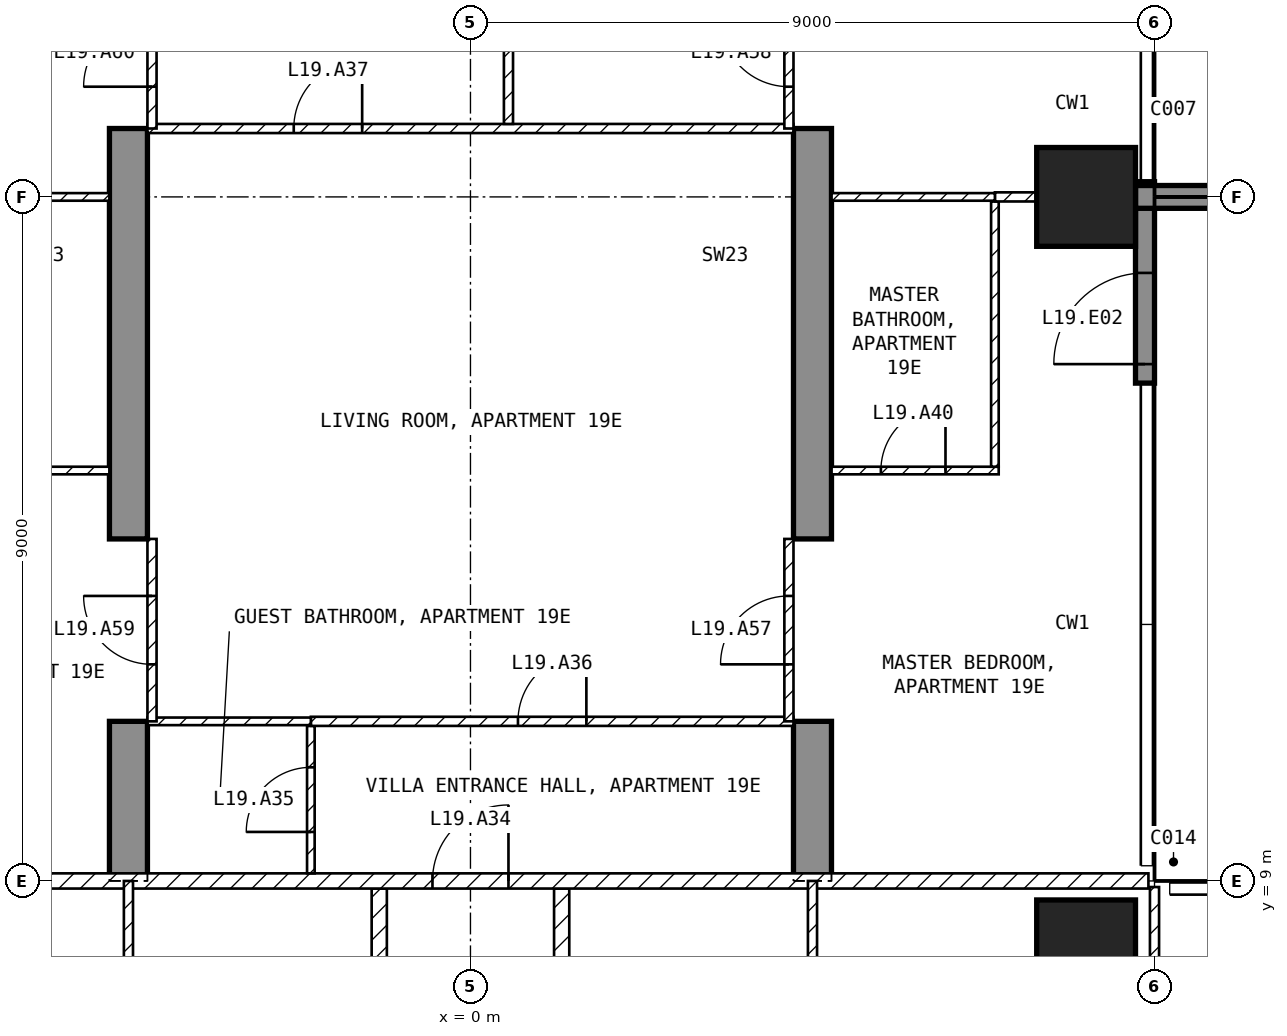
"""IFC4 building model, lengths in metres.
Left out: names, types, materials, properties, quantities, classifications, styles, units other than length and angle.
Written with IfcOpenShell. Run it as: python <this file> out.ifc"""

import sys

from ifc_helpers import new_model, si_unit, direction, frame, frame_2d, origin, origin_2d, place, context, subcontext, project, spatial, polyline, rectangle, outline, extrude, element, fill, save


model = new_model("IFC4")
c1 = context("Model", 3, precision=1e-05, world=origin(), true_north=direction((0.0, 1.0)))
c2 = subcontext(c1, "Body", "Model", "MODEL_VIEW")
j1 = project(units=[si_unit("LENGTHUNIT", "METRE"), si_unit("PLANEANGLEUNIT", "RADIAN")], contexts=[c1])
p1 = place(None, origin())
s1 = spatial("IfcSite", under=j1, at=p1, CompositionType="ELEMENT")
p2 = place(p1, origin())
s2 = spatial("IfcBuilding", under=s1, at=p2, CompositionType="ELEMENT")
p3 = place(p2, frame((0.0, 0.0, 85.5)))
s3 = spatial("IfcBuildingStorey", under=s2, at=p3, CompositionType="ELEMENT", Elevation=85.5)
for number, where, z_axis, x_axis in (
    (1, (8.1, 8.1, -0.25), (0.0, 0.0, 1.0), (1.0, 0.0, 0.0)),
    (2, (8.1, 18.0, -0.25), (0.0, 0.0, 1.0), (1.0, 0.0, 0.0)),
):
    element("IfcColumn", number, at=place(p3, frame(where, z_axis=z_axis, x_axis=x_axis)), inside=s3, PredefinedType="COLUMN", context=c2, shape_type="SweptSolid", body=[
        extrude(rectangle(XDim=1.3, YDim=1.3, at=origin_2d()), origin(), (0.0, 0.0, 1.0), 3.5),
    ])
for number, where, z_axis, x_axis in (
    (3, (-4.75, 9.0, -0.25), (1.0, 0.0, 0.0), (0.0, 1.0, 0.0)),
    (4, (4.25, 9.0, -0.25), (1.0, 0.0, 0.0), (0.0, 1.0, 0.0)),
):
    element("IfcWall", number, at=place(p3, frame(where, z_axis=z_axis, x_axis=x_axis)), inside=s3, PredefinedType="SHEAR", context=c2, shape_type="SweptSolid", body=[
        extrude(outline(polyline([(0.0, 0.0), (2.1, 0.0), (2.1, 2.65), (4.5, 2.65), (4.5, 0.0), (9.9, 0.0), (9.9, 2.65), (12.3, 2.65), (12.3, 0.0), (16.45, 0.0), (16.45, 3.5), (0.0, 3.5), (0.0, 0.0)])), origin(), (0.0, 0.0, 1.0), 0.5),
    ])
p4 = place(p3, frame((8.875, 15.55, 0.0), z_axis=(0.0, 0.0, 1.0), x_axis=(0.0, 1.0, 0.0)))
e5 = element("IfcWall", 5, at=p4, inside=s3, PredefinedType="SOLIDWALL", context=c2, shape_type="SweptSolid", body=[
    extrude(rectangle(XDim=2.65, YDim=0.25, at=frame_2d((1.325, 0.0))), origin(), (0.0, 0.0, 1.0), 3.25),
])
p5 = place(p4, frame((0.25, 0.0, 0.0)))
e6 = element("IfcOpeningElement", 6, at=p5, cuts=e5, PredefinedType="OPENING", context=c2, shape_type="SweptSolid", body=[
    extrude(rectangle(XDim=1.2, YDim=2.4, at=frame_2d((0.6, 1.2))), frame((0.0, 0.135, 0.0), z_axis=(0.0, -1.0, 0.0), x_axis=(1.0, 0.0, 0.0)), (0.0, 0.0, 1.0), 0.27),
])
p6 = place(p3, frame((8.75, 18.0, 0.0), z_axis=(0.0, 0.0, 1.0), x_axis=(1.0, 0.0, 0.0)))
e7 = element("IfcWall", 7, at=p6, inside=s3, PredefinedType="SOLIDWALL", context=c2, shape_type="SweptSolid", body=[
    extrude(rectangle(XDim=2.95, YDim=0.3, at=frame_2d((1.475, 0.0))), origin(), (0.0, 0.0, 1.0), 3.25),
])
for number, where, z_axis, x_axis in (
    (8, (1.2, 8.9, 0.0), (0.0, 0.0, 1.0), (0.0, -1.0, 0.0)),
    (9, (-1.2, 1.3, 0.0), (0.0, 0.0, 1.0), (0.0, 1.0, 0.0)),
):
    element("IfcWall", number, at=place(p3, frame(where, z_axis=z_axis, x_axis=x_axis)), inside=s3, PredefinedType="PARTITIONING", context=c2, shape_type="SweptSolid", body=[
        extrude(rectangle(XDim=7.6, YDim=0.2, at=frame_2d((3.8, 0.0))), origin(), (0.0, 0.0, 1.0), 3.25),
    ])
p7 = place(p3, frame((-8.92, 9.0, 0.0), z_axis=(0.0, 0.0, 1.0), x_axis=(1.0, 0.0, 0.0)))
e10 = element("IfcWall", 10, at=p7, inside=s3, PredefinedType="PARTITIONING", context=c2, shape_type="SweptSolid", body=[
    extrude(rectangle(XDim=17.84, YDim=0.2, at=frame_2d((8.92, 0.0))), origin(), (0.0, 0.0, 1.0), 3.25),
])
p8 = place(p7, frame((8.42, 0.0, 0.0)))
e11 = element("IfcOpeningElement", 11, at=p8, cuts=e10, PredefinedType="OPENING", context=c2, shape_type="SweptSolid", body=[
    extrude(rectangle(XDim=1.0, YDim=2.1, at=frame_2d((0.5, 1.05))), frame((0.0, 0.11, 0.0), z_axis=(0.0, -1.0, 0.0), x_axis=(1.0, 0.0, 0.0)), (0.0, 0.0, 1.0), 0.22),
])
p9 = place(p3, frame((9.0, 5.1, 0.0), z_axis=(0.0, 0.0, 1.0), x_axis=(0.0, 1.0, 0.0)))
e12 = element("IfcWall", 12, at=p9, inside=s3, PredefinedType="PARTITIONING", context=c2, shape_type="SweptSolid", body=[
    extrude(rectangle(XDim=3.82, YDim=0.12, at=frame_2d((1.91, 0.0))), origin(), (0.0, 0.0, 1.0), 3.25),
])
p10 = place(p9, frame((0.25, 0.0, 0.0)))
e13 = element("IfcOpeningElement", 13, at=p10, cuts=e12, PredefinedType="OPENING", context=c2, shape_type="SweptSolid", body=[
    extrude(rectangle(XDim=0.9, YDim=2.1, at=frame_2d((0.45, 1.05))), frame((0.0, 0.07, 0.0), z_axis=(0.0, -1.0, 0.0), x_axis=(1.0, 0.0, 0.0)), (0.0, 0.0, 1.0), 0.14),
])
p11 = place(p3, frame((4.5, 1.3, 0.0), z_axis=(0.0, 0.0, 1.0), x_axis=(0.0, 1.0, 0.0)))
e14 = element("IfcWall", 14, at=p11, inside=s3, PredefinedType="PARTITIONING", context=c2, shape_type="SweptSolid", body=[
    extrude(rectangle(XDim=7.7, YDim=0.12, at=frame_2d((3.85, 0.0))), origin(), (0.0, 0.0, 1.0), 3.25),
])
p12 = place(p11, frame((4.988, 0.0, 0.0)))
e15 = element("IfcOpeningElement", 15, at=p12, cuts=e14, PredefinedType="OPENING", context=c2, shape_type="SweptSolid", body=[
    extrude(rectangle(XDim=0.9, YDim=2.1, at=frame_2d((0.45, 1.05))), frame((0.0, 0.07, 0.0), z_axis=(0.0, -1.0, 0.0), x_axis=(1.0, 0.0, 0.0)), (0.0, 0.0, 1.0), 0.14),
])
p13 = place(p3, frame((-4.5, 9.0, 0.0), z_axis=(0.0, 0.0, 1.0), x_axis=(0.0, -1.0, 0.0)))
e16 = element("IfcWall", 16, at=p13, inside=s3, PredefinedType="PARTITIONING", context=c2, shape_type="SweptSolid", body=[
    extrude(rectangle(XDim=7.7, YDim=0.12, at=frame_2d((3.85, 0.0))), origin(), (0.0, 0.0, 1.0), 3.25),
])
p14 = place(p13, frame((4.96, 0.0, 0.0)))
e17 = element("IfcOpeningElement", 17, at=p14, cuts=e16, PredefinedType="OPENING", context=c2, shape_type="SweptSolid", body=[
    extrude(rectangle(XDim=0.9, YDim=2.1, at=frame_2d((0.45, 1.05))), frame((0.0, 0.07, 0.0), z_axis=(0.0, -1.0, 0.0), x_axis=(1.0, 0.0, 0.0)), (0.0, 0.0, 1.0), 0.14),
])
p15 = place(p3, frame((-2.1, 9.1, 0.0), z_axis=(0.0, 0.0, 1.0), x_axis=(0.0, 1.0, 0.0)))
e18 = element("IfcWall", 18, at=p15, inside=s3, PredefinedType="PARTITIONING", context=c2, shape_type="SweptSolid", body=[
    extrude(rectangle(XDim=1.94, YDim=0.1, at=frame_2d((0.97, 0.0))), origin(), (0.0, 0.0, 1.0), 3.25),
])
p16 = place(p15, frame((0.545, 0.0, 0.0)))
e19 = element("IfcOpeningElement", 19, at=p16, cuts=e18, PredefinedType="OPENING", context=c2, shape_type="SweptSolid", body=[
    extrude(rectangle(XDim=0.85, YDim=2.1, at=frame_2d((0.425, 1.05))), frame((0.0, 0.06, 0.0), z_axis=(0.0, -1.0, 0.0), x_axis=(1.0, 0.0, 0.0)), (0.0, 0.0, 1.0), 0.12),
])
p17 = place(p3, frame((-2.1, 11.1, 0.0), z_axis=(0.0, 0.0, 1.0), x_axis=(1.0, 0.0, 0.0)))
e20 = element("IfcWall", 20, at=p17, inside=s3, PredefinedType="PARTITIONING", context=c2, shape_type="SweptSolid", body=[
    extrude(rectangle(XDim=6.35, YDim=0.12, at=frame_2d((3.175, 0.0))), origin(), (0.0, 0.0, 1.0), 3.25),
])
p18 = place(p17, frame((2.725, 0.0, 0.0)))
e21 = element("IfcOpeningElement", 21, at=p18, cuts=e20, PredefinedType="OPENING", context=c2, shape_type="SweptSolid", body=[
    extrude(rectangle(XDim=0.9, YDim=2.1, at=frame_2d((0.45, 1.05))), frame((0.0, 0.07, 0.0), z_axis=(0.0, -1.0, 0.0), x_axis=(1.0, 0.0, 0.0)), (0.0, 0.0, 1.0), 0.14),
])
p19 = place(p3, frame((-4.25, 11.1, 0.0), z_axis=(0.0, 0.0, 1.0), x_axis=(1.0, 0.0, 0.0)))
e22 = element("IfcWall", 22, at=p19, inside=s3, PredefinedType="PARTITIONING", context=c2, shape_type="SweptSolid", body=[
    extrude(rectangle(XDim=2.15, YDim=0.1, at=frame_2d((1.075, 0.0))), origin(), (0.0, 0.0, 1.0), 3.25),
])
p20 = place(p3, frame((-4.25, 18.9, 0.0), z_axis=(0.0, 0.0, 1.0), x_axis=(1.0, 0.0, 0.0)))
e23 = element("IfcWall", 23, at=p20, inside=s3, PredefinedType="PARTITIONING", context=c2, shape_type="SweptSolid", body=[
    extrude(rectangle(XDim=8.5, YDim=0.12, at=frame_2d((4.25, 0.0))), origin(), (0.0, 0.0, 1.0), 3.25),
])
p21 = place(p20, frame((1.925, 0.0, 0.0)))
e24 = element("IfcOpeningElement", 24, at=p21, cuts=e23, PredefinedType="OPENING", context=c2, shape_type="SweptSolid", body=[
    extrude(rectangle(XDim=0.9, YDim=2.1, at=frame_2d((0.45, 1.05))), frame((0.0, 0.07, 0.0), z_axis=(0.0, -1.0, 0.0), x_axis=(1.0, 0.0, 0.0)), (0.0, 0.0, 1.0), 0.14),
])
p22 = place(p3, frame((0.5, 23.34, 0.0), z_axis=(0.0, 0.0, 1.0), x_axis=(0.0, -1.0, 0.0)))
e25 = element("IfcWall", 25, at=p22, inside=s3, PredefinedType="PARTITIONING", context=c2, shape_type="SweptSolid", body=[
    extrude(rectangle(XDim=4.38, YDim=0.12, at=frame_2d((2.19, 0.0))), origin(), (0.0, 0.0, 1.0), 3.25),
])
p23 = place(p22, frame((1.74, 0.0, 0.0)))
e26 = element("IfcOpeningElement", 26, at=p23, cuts=e25, PredefinedType="OPENING", context=c2, shape_type="SweptSolid", body=[
    extrude(rectangle(XDim=0.9, YDim=2.1, at=frame_2d((0.45, 1.05))), frame((0.0, 0.07, 0.0), z_axis=(0.0, -1.0, 0.0), x_axis=(1.0, 0.0, 0.0)), (0.0, 0.0, 1.0), 0.14),
])
p24 = place(p3, frame((4.75, 14.4, 0.0), z_axis=(0.0, 0.0, 1.0), x_axis=(1.0, 0.0, 0.0)))
e27 = element("IfcWall", 27, at=p24, inside=s3, PredefinedType="PARTITIONING", context=c2, shape_type="SweptSolid", body=[
    extrude(rectangle(XDim=2.2, YDim=0.1, at=frame_2d((1.1, 0.0))), origin(), (0.0, 0.0, 1.0), 3.25),
])
p25 = place(p24, frame((0.65, 0.0, 0.0)))
e28 = element("IfcOpeningElement", 28, at=p25, cuts=e27, PredefinedType="OPENING", context=c2, shape_type="SweptSolid", body=[
    extrude(rectangle(XDim=0.85, YDim=2.1, at=frame_2d((0.425, 1.05))), frame((0.0, 0.06, 0.0), z_axis=(0.0, -1.0, 0.0), x_axis=(1.0, 0.0, 0.0)), (0.0, 0.0, 1.0), 0.12),
])
p26 = place(p3, frame((6.9, 14.45, 0.0), z_axis=(0.0, 0.0, 1.0), x_axis=(0.0, 1.0, 0.0)))
e29 = element("IfcWall", 29, at=p26, inside=s3, PredefinedType="PARTITIONING", context=c2, shape_type="SweptSolid", body=[
    extrude(rectangle(XDim=3.49, YDim=0.1, at=frame_2d((1.745, 0.0))), origin(), (0.0, 0.0, 1.0), 3.25),
])
p27 = place(p3, frame((6.9, 18.0, 0.0), z_axis=(0.0, 0.0, 1.0), x_axis=(1.0, 0.0, 0.0)))
e30 = element("IfcWall", 30, at=p27, inside=s3, PredefinedType="PARTITIONING", context=c2, shape_type="SweptSolid", body=[
    extrude(rectangle(XDim=0.55, YDim=0.12, at=frame_2d((0.275, 0.0))), origin(), (0.0, 0.0, 1.0), 2.346),
])
p28 = place(p3, frame((4.75, 18.0, 0.0), z_axis=(0.0, 0.0, 1.0), x_axis=(1.0, 0.0, 0.0)))
e31 = element("IfcWall", 31, at=p28, inside=s3, PredefinedType="PARTITIONING", context=c2, shape_type="SweptSolid", body=[
    extrude(rectangle(XDim=2.15, YDim=0.1, at=frame_2d((1.075, 0.0))), origin(), (0.0, 0.0, 1.0), 2.346),
])
p29 = place(p3, frame((-6.95, 14.4, 0.0), z_axis=(0.0, 0.0, 1.0), x_axis=(1.0, 0.0, 0.0)))
e32 = element("IfcWall", 32, at=p29, inside=s3, PredefinedType="PARTITIONING", context=c2, shape_type="SweptSolid", body=[
    extrude(rectangle(XDim=2.2, YDim=0.1, at=frame_2d((1.1, 0.0))), origin(), (0.0, 0.0, 1.0), 3.25),
])
p30 = place(p3, frame((-6.9, 18.0, 0.0), z_axis=(0.0, 0.0, 1.0), x_axis=(1.0, 0.0, 0.0)))
e33 = element("IfcWall", 33, at=p30, inside=s3, PredefinedType="PARTITIONING", context=c2, shape_type="SweptSolid", body=[
    extrude(rectangle(XDim=2.15, YDim=0.1, at=frame_2d((1.075, 0.0))), origin(), (0.0, 0.0, 1.0), 2.346),
])
p31 = place(p3, frame((4.19, 11.1, 0.0), z_axis=(0.0, 0.0, 1.0), x_axis=(0.0, 1.0, 0.0)))
e34 = element("IfcWall", 34, at=p31, inside=s3, PredefinedType="PARTITIONING", context=c2, shape_type="SweptSolid", body=[
    extrude(rectangle(XDim=2.4, YDim=0.12, at=frame_2d((1.2, 0.0))), origin(), (0.0, 0.0, 1.0), 2.4),
])
p32 = place(p31, frame((0.75, 0.0, 0.0)))
e35 = element("IfcOpeningElement", 35, at=p32, cuts=e34, PredefinedType="OPENING", context=c2, shape_type="SweptSolid", body=[
    extrude(rectangle(XDim=0.9, YDim=2.1, at=frame_2d((0.45, 1.05))), frame((0.0, 0.07, 0.0), z_axis=(0.0, -1.0, 0.0), x_axis=(1.0, 0.0, 0.0)), (0.0, 0.0, 1.0), 0.14),
])
p33 = place(p3, frame((4.19, 18.9, 0.0), z_axis=(0.0, 0.0, 1.0), x_axis=(0.0, 1.0, 0.0)))
e36 = element("IfcWall", 36, at=p33, inside=s3, PredefinedType="PARTITIONING", context=c2, shape_type="SweptSolid", body=[
    extrude(rectangle(XDim=2.4, YDim=0.12, at=frame_2d((1.2, 0.0))), origin(), (0.0, 0.0, 1.0), 2.4),
])
p34 = place(p33, frame((0.55, 0.0, 0.0)))
e37 = element("IfcOpeningElement", 37, at=p34, cuts=e36, PredefinedType="OPENING", context=c2, shape_type="SweptSolid", body=[
    extrude(rectangle(XDim=0.9, YDim=2.1, at=frame_2d((0.45, 1.05))), frame((0.0, 0.07, 0.0), z_axis=(0.0, -1.0, 0.0), x_axis=(1.0, 0.0, 0.0)), (0.0, 0.0, 1.0), 0.14),
])
p35 = place(p3, frame((-4.19, 11.1, 0.0), z_axis=(0.0, 0.0, 1.0), x_axis=(0.0, 1.0, 0.0)))
e38 = element("IfcWall", 38, at=p35, inside=s3, PredefinedType="PARTITIONING", context=c2, shape_type="SweptSolid", body=[
    extrude(rectangle(XDim=2.4, YDim=0.12, at=frame_2d((1.2, 0.0))), origin(), (0.0, 0.0, 1.0), 2.4),
])
p36 = place(p35, frame((0.75, 0.0, 0.0)))
e39 = element("IfcOpeningElement", 39, at=p36, cuts=e38, PredefinedType="OPENING", context=c2, shape_type="SweptSolid", body=[
    extrude(rectangle(XDim=0.9, YDim=2.1, at=frame_2d((0.45, 1.05))), frame((0.0, 0.07, 0.0), z_axis=(0.0, -1.0, 0.0), x_axis=(1.0, 0.0, 0.0)), (0.0, 0.0, 1.0), 0.14),
])
p37 = place(p3, frame((-4.19, 18.9, 0.0), z_axis=(0.0, 0.0, 1.0), x_axis=(0.0, 1.0, 0.0)))
e40 = element("IfcWall", 40, at=p37, inside=s3, PredefinedType="PARTITIONING", context=c2, shape_type="SweptSolid", body=[
    extrude(rectangle(XDim=2.4, YDim=0.12, at=frame_2d((1.2, 0.0))), origin(), (0.0, 0.0, 1.0), 2.4),
])
p38 = place(p37, frame((0.55, 0.0, 0.0)))
e41 = element("IfcOpeningElement", 41, at=p38, cuts=e40, PredefinedType="OPENING", context=c2, shape_type="SweptSolid", body=[
    extrude(rectangle(XDim=0.9, YDim=2.1, at=frame_2d((0.45, 1.05))), frame((0.0, 0.07, 0.0), z_axis=(0.0, -1.0, 0.0), x_axis=(1.0, 0.0, 0.0)), (0.0, 0.0, 1.0), 0.14),
])
p39 = place(p5, origin())
e42 = element("IfcDoor", 42, at=p39, inside=s3, OperationType="SINGLE_SWING_LEFT", PredefinedType="DOOR", context=c2, shape_type="SweptSolid", body=[
    extrude(rectangle(XDim=1.2, YDim=2.4, at=frame_2d((0.6, 1.2))), frame((0.0, 0.025, 0.0), z_axis=(0.0, -1.0, 0.0), x_axis=(1.0, 0.0, 0.0)), (0.0, 0.0, 1.0), 0.05),
])
fill(e6, e42)
p40 = place(p8, origin())
e43 = element("IfcDoor", 43, at=p40, inside=s3, OperationType="SINGLE_SWING_RIGHT", PredefinedType="DOOR", context=c2, shape_type="SweptSolid", body=[
    extrude(rectangle(XDim=1.0, YDim=2.1, at=frame_2d((0.5, 1.05))), frame((0.0, 0.025, 0.0), z_axis=(0.0, -1.0, 0.0), x_axis=(1.0, 0.0, 0.0)), (0.0, 0.0, 1.0), 0.05),
])
fill(e11, e43)
p41 = place(p16, origin())
e44 = element("IfcDoor", 44, at=p41, inside=s3, OperationType="SINGLE_SWING_LEFT", PredefinedType="DOOR", context=c2, shape_type="SweptSolid", body=[
    extrude(rectangle(XDim=0.85, YDim=2.1, at=frame_2d((0.425, 1.05))), frame((0.0, 0.025, 0.0), z_axis=(0.0, -1.0, 0.0), x_axis=(1.0, 0.0, 0.0)), (0.0, 0.0, 1.0), 0.05),
])
fill(e19, e44)
p42 = place(p18, origin())
e45 = element("IfcDoor", 45, at=p42, inside=s3, OperationType="SINGLE_SWING_RIGHT", PredefinedType="DOOR", context=c2, shape_type="SweptSolid", body=[
    extrude(rectangle(XDim=0.9, YDim=2.1, at=frame_2d((0.45, 1.05))), frame((0.0, 0.025, 0.0), z_axis=(0.0, -1.0, 0.0), x_axis=(1.0, 0.0, 0.0)), (0.0, 0.0, 1.0), 0.05),
])
fill(e21, e45)
p43 = place(p21, origin())
e46 = element("IfcDoor", 46, at=p43, inside=s3, OperationType="SINGLE_SWING_RIGHT", PredefinedType="DOOR", context=c2, shape_type="SweptSolid", body=[
    extrude(rectangle(XDim=0.9, YDim=2.1, at=frame_2d((0.45, 1.05))), frame((0.0, 0.025, 0.0), z_axis=(0.0, -1.0, 0.0), x_axis=(1.0, 0.0, 0.0)), (0.0, 0.0, 1.0), 0.05),
])
fill(e24, e46)
p44 = place(p25, origin())
e47 = element("IfcDoor", 47, at=p44, inside=s3, OperationType="SINGLE_SWING_RIGHT", PredefinedType="DOOR", context=c2, shape_type="SweptSolid", body=[
    extrude(rectangle(XDim=0.85, YDim=2.1, at=frame_2d((0.425, 1.05))), frame((0.0, 0.025, 0.0), z_axis=(0.0, -1.0, 0.0), x_axis=(1.0, 0.0, 0.0)), (0.0, 0.0, 1.0), 0.05),
])
fill(e28, e47)
p45 = place(p32, origin())
e48 = element("IfcDoor", 48, at=p45, inside=s3, OperationType="SINGLE_SWING_LEFT", PredefinedType="DOOR", context=c2, shape_type="SweptSolid", body=[
    extrude(rectangle(XDim=0.9, YDim=2.1, at=frame_2d((0.45, 1.05))), frame((0.0, 0.025, 0.0), z_axis=(0.0, -1.0, 0.0), x_axis=(1.0, 0.0, 0.0)), (0.0, 0.0, 1.0), 0.05),
])
fill(e35, e48)
p46 = place(p34, origin())
e49 = element("IfcDoor", 49, at=p46, inside=s3, OperationType="SINGLE_SWING_RIGHT", PredefinedType="DOOR", context=c2, shape_type="SweptSolid", body=[
    extrude(rectangle(XDim=0.9, YDim=2.1, at=frame_2d((0.45, 1.05))), frame((0.0, 0.025, 0.0), z_axis=(0.0, -1.0, 0.0), x_axis=(1.0, 0.0, 0.0)), (0.0, 0.0, 1.0), 0.05),
])
fill(e37, e49)
p47 = place(p36, origin())
e50 = element("IfcDoor", 50, at=p47, inside=s3, OperationType="SINGLE_SWING_RIGHT", PredefinedType="DOOR", context=c2, shape_type="SweptSolid", body=[
    extrude(rectangle(XDim=0.9, YDim=2.1, at=frame_2d((0.45, 1.05))), frame((0.0, 0.025, 0.0), z_axis=(0.0, -1.0, 0.0), x_axis=(1.0, 0.0, 0.0)), (0.0, 0.0, 1.0), 0.05),
])
fill(e39, e50)
p48 = place(p38, origin())
e51 = element("IfcDoor", 51, at=p48, inside=s3, OperationType="SINGLE_SWING_LEFT", PredefinedType="DOOR", context=c2, shape_type="SweptSolid", body=[
    extrude(rectangle(XDim=0.9, YDim=2.1, at=frame_2d((0.45, 1.05))), frame((0.0, 0.025, 0.0), z_axis=(0.0, -1.0, 0.0), x_axis=(1.0, 0.0, 0.0)), (0.0, 0.0, 1.0), 0.05),
])
fill(e41, e51)
save(model, sys.argv[1])
